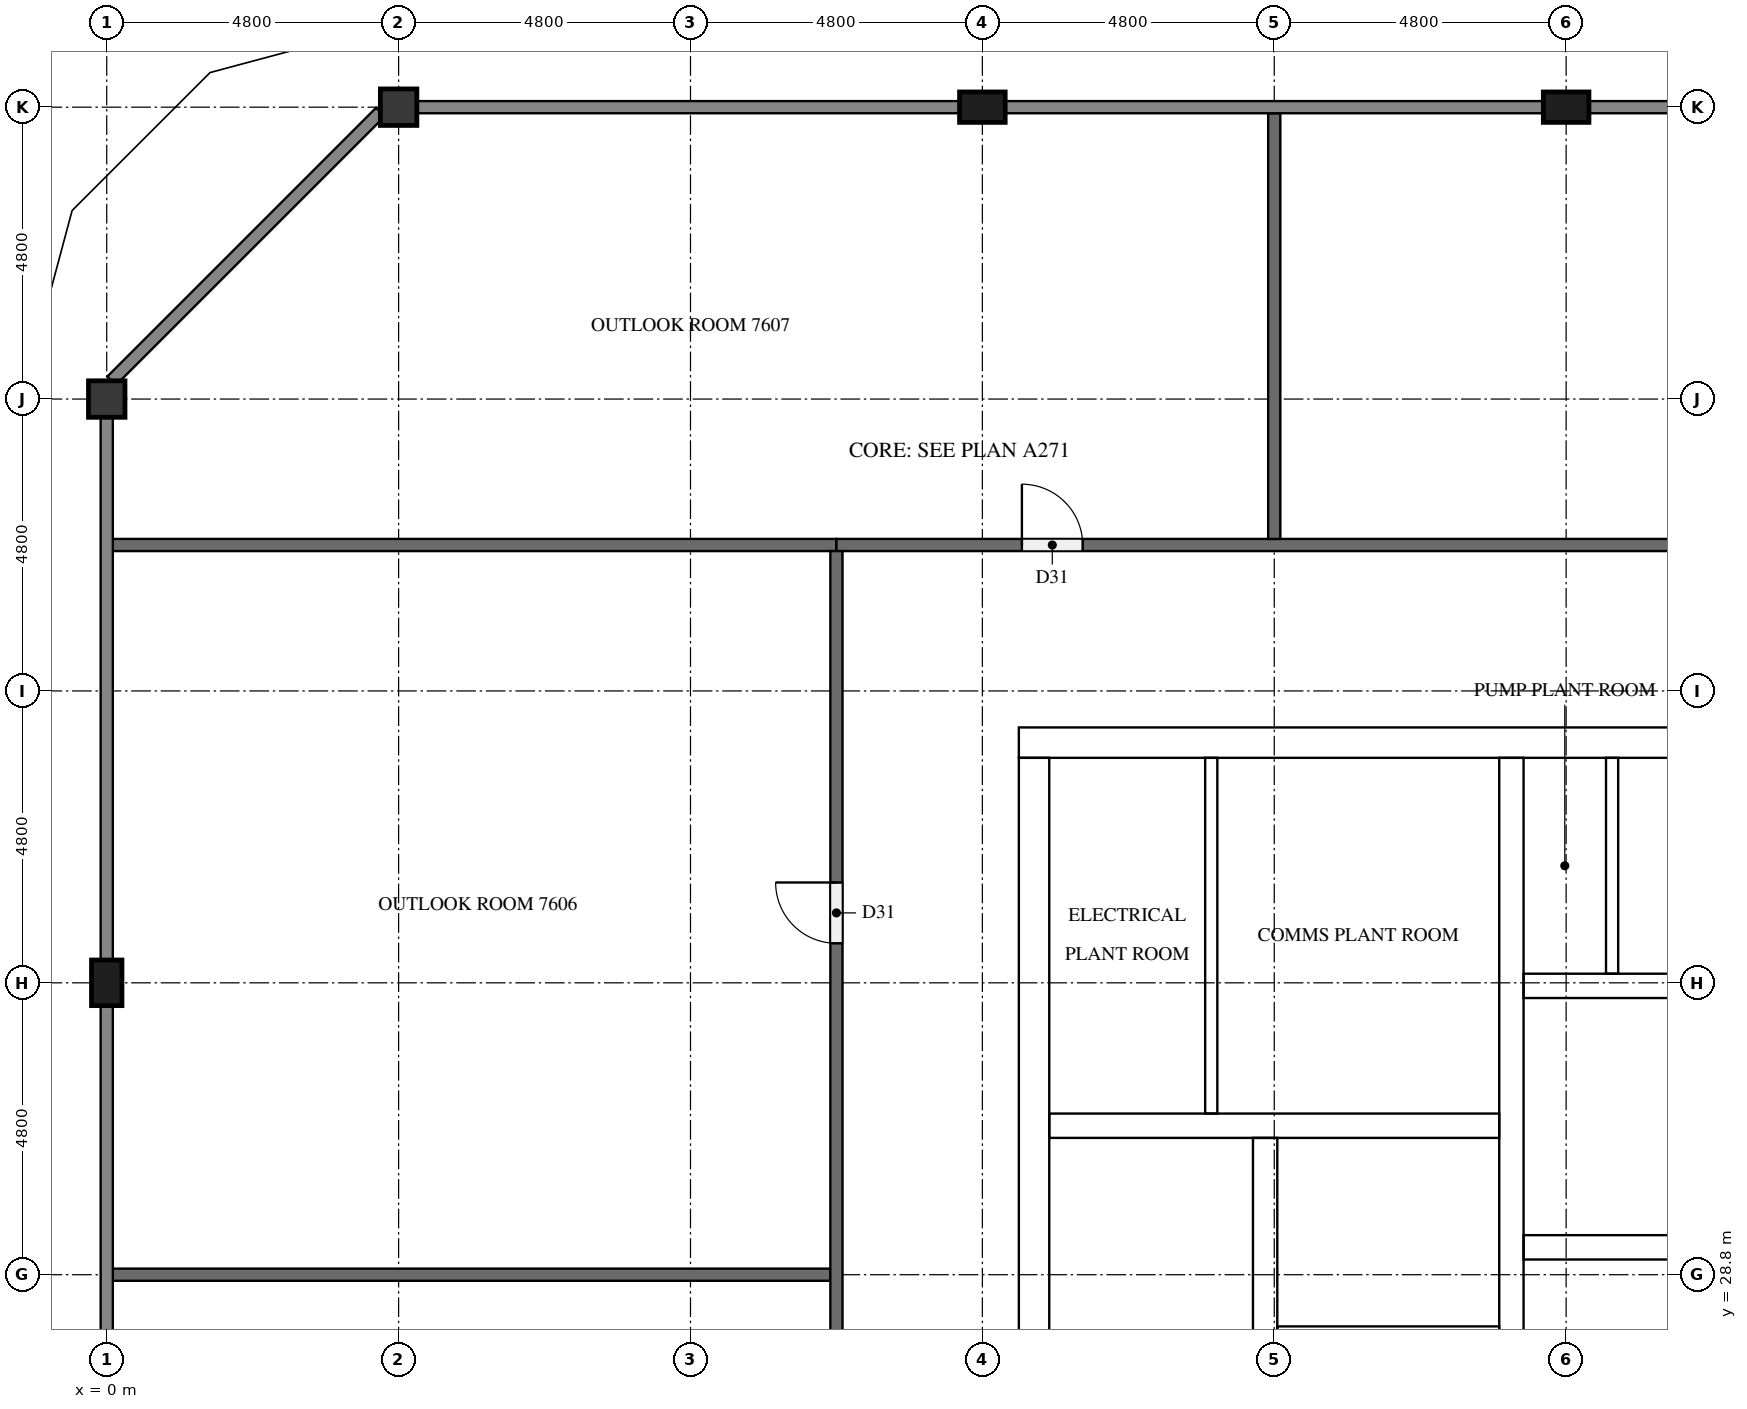
"""IFC4 building model, lengths in metres.
Left out: names, types, materials, properties, quantities, classifications, styles, units other than length and angle.
Written with IfcOpenShell. Run it as: python <this file> out.ifc"""

import sys

from ifc_helpers import new_model, si_unit, direction, frame, frame_2d, origin, origin_2d, place, context, subcontext, project, spatial, rectangle, extrude, element, fill, save


model = new_model("IFC4")
c1 = context("Model", 3, precision=1e-05, world=origin(), true_north=direction((0.0, 1.0)))
c2 = subcontext(c1, "Body", "Model", "MODEL_VIEW")
j1 = project(units=[si_unit("LENGTHUNIT", "METRE"), si_unit("PLANEANGLEUNIT", "RADIAN")], contexts=[c1])
p1 = place(None, origin())
s1 = spatial("IfcSite", under=j1, at=p1, CompositionType="ELEMENT")
p2 = place(p1, origin())
s2 = spatial("IfcBuilding", under=s1, at=p2, CompositionType="ELEMENT")
p3 = place(p2, frame((0.0, 0.0, 291.5)))
s3 = spatial("IfcBuildingStorey", under=s2, at=p3, CompositionType="ELEMENT", Elevation=291.5)
p4 = place(p3, frame((15.0, 37.55, 0.0), z_axis=(0.0, 0.0, 1.0), x_axis=(1.0, 0.0, 0.0)))
e1 = element("IfcWall", 1, at=p4, inside=s3, PredefinedType="SHEAR", context=c2, shape_type="SweptSolid", body=[
    extrude(rectangle(XDim=32.4, YDim=0.5, at=frame_2d((16.2, 0.0))), origin(), (0.0, 0.0, 1.0), 4.4),
])
p5 = place(p4, frame((15.3, 0.0, 0.0)))
e2 = element("IfcOpeningElement", 2, at=p5, cuts=e1, PredefinedType="OPENING", context=c2, shape_type="SweptSolid", body=[
    extrude(rectangle(XDim=1.8, YDim=2.1, at=frame_2d((0.9, 1.05))), frame((0.0, 0.26, 0.0), z_axis=(0.0, -1.0, 0.0), x_axis=(1.0, 0.0, 0.0)), (0.0, 0.0, 1.0), 0.52),
])
p6 = place(p4, frame((1.282, 0.0, 0.0)))
e3 = element("IfcOpeningElement", 3, at=p6, cuts=e1, PredefinedType="OPENING", context=c2, shape_type="SweptSolid", body=[
    extrude(rectangle(XDim=1.0, YDim=2.1, at=frame_2d((0.5, 1.05))), frame((0.0, 0.26, 0.0), z_axis=(0.0, -1.0, 0.0), x_axis=(1.0, 0.0, 0.0)), (0.0, 0.0, 1.0), 0.52),
])
p7 = place(p4, frame((5.082, 0.0, 0.0)))
e4 = element("IfcOpeningElement", 4, at=p7, cuts=e1, PredefinedType="OPENING", context=c2, shape_type="SweptSolid", body=[
    extrude(rectangle(XDim=1.0, YDim=2.1, at=frame_2d((0.5, 1.05))), frame((0.0, 0.26, 0.0), z_axis=(0.0, -1.0, 0.0), x_axis=(1.0, 0.0, 0.0)), (0.0, 0.0, 1.0), 0.52),
])
p8 = place(p3, frame((15.25, 15.5, 0.0), z_axis=(0.0, 0.0, 1.0), x_axis=(0.0, 1.0, 0.0)))
e5 = element("IfcWall", 5, at=p8, inside=s3, PredefinedType="SHEAR", context=c2, shape_type="SweptSolid", body=[
    extrude(rectangle(XDim=21.8, YDim=0.5, at=frame_2d((10.9, 0.0))), origin(), (0.0, 0.0, 1.0), 4.4),
])
p9 = place(p8, frame((5.26, 0.0, 0.0)))
e6 = element("IfcOpeningElement", 6, at=p9, cuts=e5, PredefinedType="OPENING", context=c2, shape_type="SweptSolid", body=[
    extrude(rectangle(XDim=1.2, YDim=2.1, at=frame_2d((0.6, 1.05))), frame((0.0, 0.26, 0.0), z_axis=(0.0, -1.0, 0.0), x_axis=(1.0, 0.0, 0.0)), (0.0, 0.0, 1.0), 0.52),
])
p10 = place(p3, frame((19.05, 15.5, 0.0), z_axis=(0.0, 0.0, 1.0), x_axis=(0.0, 1.0, 0.0)))
e7 = element("IfcWall", 7, at=p10, inside=s3, PredefinedType="SHEAR", context=c2, shape_type="SweptSolid", body=[
    extrude(rectangle(XDim=15.55, YDim=0.4, at=frame_2d((7.775, 0.0))), origin(), (0.0, 0.0, 1.0), 4.4),
])
p11 = place(p10, frame((9.95, 0.0, 0.0)))
e8 = element("IfcOpeningElement", 8, at=p11, cuts=e7, PredefinedType="OPENING", context=c2, shape_type="SweptSolid", body=[
    extrude(rectangle(XDim=1.1, YDim=2.1, at=frame_2d((0.55, 1.05))), frame((0.0, 0.21, 0.0), z_axis=(0.0, -1.0, 0.0), x_axis=(1.0, 0.0, 0.0)), (0.0, 0.0, 1.0), 0.42),
])
p12 = place(p10, frame((13.45, 0.0, 0.0)))
e9 = element("IfcOpeningElement", 9, at=p12, cuts=e7, PredefinedType="OPENING", context=c2, shape_type="SweptSolid", body=[
    extrude(rectangle(XDim=1.1, YDim=2.1, at=frame_2d((0.55, 1.05))), frame((0.0, 0.21, 0.0), z_axis=(0.0, -1.0, 0.0), x_axis=(1.0, 0.0, 0.0)), (0.0, 0.0, 1.0), 0.42),
])
p13 = place(p10, frame((0.7, 0.0, 0.0)))
e10 = element("IfcOpeningElement", 10, at=p13, cuts=e7, PredefinedType="OPENING", context=c2, shape_type="SweptSolid", body=[
    extrude(rectangle(XDim=1.2, YDim=2.1, at=frame_2d((0.6, 1.05))), frame((0.0, 0.21, 0.0), z_axis=(0.0, -1.0, 0.0), x_axis=(1.0, 0.0, 0.0)), (0.0, 0.0, 1.0), 0.42),
])
p14 = place(p3, frame((23.1, 15.5, 0.0), z_axis=(0.0, 0.0, 1.0), x_axis=(0.0, 1.0, 0.0)))
e11 = element("IfcWall", 11, at=p14, inside=s3, PredefinedType="SHEAR", context=c2, shape_type="SweptSolid", body=[
    extrude(rectangle(XDim=21.8, YDim=0.4, at=frame_2d((10.9, 0.0))), origin(), (0.0, 0.0, 1.0), 4.4),
])
p15 = place(p3, frame((19.25, 27.75, 0.0), z_axis=(0.0, 0.0, 1.0), x_axis=(1.0, 0.0, 0.0)))
e12 = element("IfcWall", 12, at=p15, inside=s3, PredefinedType="SHEAR", context=c2, shape_type="SweptSolid", body=[
    extrude(rectangle(XDim=3.65, YDim=0.4, at=frame_2d((1.825, 0.0))), origin(), (0.0, 0.0, 1.0), 4.4),
])
p16 = place(p3, frame((15.5, 31.25, 0.0), z_axis=(0.0, 0.0, 1.0), x_axis=(1.0, 0.0, 0.0)))
e13 = element("IfcWall", 13, at=p16, inside=s3, PredefinedType="SHEAR", context=c2, shape_type="SweptSolid", body=[
    extrude(rectangle(XDim=7.4, YDim=0.4, at=frame_2d((3.7, 0.0))), origin(), (0.0, 0.0, 1.0), 4.4),
])
p17 = place(p3, frame((23.3, 29.25, 0.0), z_axis=(0.0, 0.0, 1.0), x_axis=(1.0, 0.0, 0.0)))
e14 = element("IfcWall", 14, at=p17, inside=s3, PredefinedType="SHEAR", context=c2, shape_type="SweptSolid", body=[
    extrude(rectangle(XDim=15.8, YDim=0.4, at=frame_2d((7.9, 0.0))), origin(), (0.0, 0.0, 1.0), 4.4),
])
p18 = place(p17, frame((0.683, 0.0, 0.0)))
e15 = element("IfcOpeningElement", 15, at=p18, cuts=e14, PredefinedType="OPENING", context=c2, shape_type="SweptSolid", body=[
    extrude(rectangle(XDim=1.1, YDim=2.1, at=frame_2d((0.55, 1.05))), frame((0.0, 0.21, 0.0), z_axis=(0.0, -1.0, 0.0), x_axis=(1.0, 0.0, 0.0)), (0.0, 0.0, 1.0), 0.42),
])
p19 = place(p17, frame((3.35, 0.0, 0.0)))
e16 = element("IfcOpeningElement", 16, at=p19, cuts=e14, PredefinedType="OPENING", context=c2, shape_type="SweptSolid", body=[
    extrude(rectangle(XDim=1.1, YDim=2.1, at=frame_2d((0.55, 1.05))), frame((0.0, 0.21, 0.0), z_axis=(0.0, -1.0, 0.0), x_axis=(1.0, 0.0, 0.0)), (0.0, 0.0, 1.0), 0.42),
])
p20 = place(p17, frame((6.017, 0.0, 0.0)))
e17 = element("IfcOpeningElement", 17, at=p20, cuts=e14, PredefinedType="OPENING", context=c2, shape_type="SweptSolid", body=[
    extrude(rectangle(XDim=1.1, YDim=2.1, at=frame_2d((0.55, 1.05))), frame((0.0, 0.21, 0.0), z_axis=(0.0, -1.0, 0.0), x_axis=(1.0, 0.0, 0.0)), (0.0, 0.0, 1.0), 0.42),
])
p21 = place(p17, frame((8.683, 0.0, 0.0)))
e18 = element("IfcOpeningElement", 18, at=p21, cuts=e14, PredefinedType="OPENING", context=c2, shape_type="SweptSolid", body=[
    extrude(rectangle(XDim=1.1, YDim=2.1, at=frame_2d((0.55, 1.05))), frame((0.0, 0.21, 0.0), z_axis=(0.0, -1.0, 0.0), x_axis=(1.0, 0.0, 0.0)), (0.0, 0.0, 1.0), 0.42),
])
p22 = place(p17, frame((11.35, 0.0, 0.0)))
e19 = element("IfcOpeningElement", 19, at=p22, cuts=e14, PredefinedType="OPENING", context=c2, shape_type="SweptSolid", body=[
    extrude(rectangle(XDim=1.1, YDim=2.1, at=frame_2d((0.55, 1.05))), frame((0.0, 0.21, 0.0), z_axis=(0.0, -1.0, 0.0), x_axis=(1.0, 0.0, 0.0)), (0.0, 0.0, 1.0), 0.42),
])
p23 = place(p17, frame((14.017, 0.0, 0.0)))
e20 = element("IfcOpeningElement", 20, at=p23, cuts=e14, PredefinedType="OPENING", context=c2, shape_type="SweptSolid", body=[
    extrude(rectangle(XDim=1.1, YDim=2.1, at=frame_2d((0.55, 1.05))), frame((0.0, 0.21, 0.0), z_axis=(0.0, -1.0, 0.0), x_axis=(1.0, 0.0, 0.0)), (0.0, 0.0, 1.0), 0.42),
])
p24 = place(p3, frame((23.3, 33.55, 0.0), z_axis=(0.0, 0.0, 1.0), x_axis=(1.0, 0.0, 0.0)))
e21 = element("IfcWall", 21, at=p24, inside=s3, PredefinedType="SHEAR", context=c2, shape_type="SweptSolid", body=[
    extrude(rectangle(XDim=5.6, YDim=0.4, at=frame_2d((2.8, 0.0))), origin(), (0.0, 0.0, 1.0), 4.4),
])
p25 = place(p24, frame((0.178, 0.0, 0.0)))
e22 = element("IfcOpeningElement", 22, at=p25, cuts=e21, PredefinedType="OPENING", context=c2, shape_type="SweptSolid", body=[
    extrude(rectangle(XDim=1.0, YDim=2.1, at=frame_2d((0.5, 1.05))), frame((0.0, 0.21, 0.0), z_axis=(0.0, -1.0, 0.0), x_axis=(1.0, 0.0, 0.0)), (0.0, 0.0, 1.0), 0.42),
])
p26 = place(p24, frame((2.878, 0.0, 0.0)))
e23 = element("IfcOpeningElement", 23, at=p26, cuts=e21, PredefinedType="OPENING", context=c2, shape_type="SweptSolid", body=[
    extrude(rectangle(XDim=1.0, YDim=2.1, at=frame_2d((0.5, 1.05))), frame((0.0, 0.21, 0.0), z_axis=(0.0, -1.0, 0.0), x_axis=(1.0, 0.0, 0.0)), (0.0, 0.0, 1.0), 0.42),
])
for number, where, z_axis, x_axis in (
    (24, (24.0, 48.0, 0.0), (0.0, 0.0, 1.0), (1.0, 0.0, 0.0)),
    (25, (14.4, 48.0, 0.0), (0.0, 0.0, 1.0), (1.0, 0.0, 0.0)),
):
    element("IfcColumn", number, at=place(p3, frame(where, z_axis=z_axis, x_axis=x_axis)), inside=s3, PredefinedType="COLUMN", context=c2, shape_type="SweptSolid", body=[
        extrude(rectangle(XDim=0.75, YDim=0.5, at=origin_2d()), origin(), (0.0, 0.0, 1.0), 4.4),
    ])
for number, where, z_axis, x_axis in (
    (26, (4.8, 48.0, 0.0), (0.0, 0.0, 1.0), (1.0, 0.0, 0.0)),
    (27, (0.0, 43.2, 0.0), (0.0, 0.0, 1.0), (1.0, 0.0, 0.0)),
):
    element("IfcColumn", number, at=place(p3, frame(where, z_axis=z_axis, x_axis=x_axis)), inside=s3, PredefinedType="COLUMN", context=c2, shape_type="SweptSolid", body=[
        extrude(rectangle(XDim=0.6, YDim=0.6, at=origin_2d()), origin(), (0.0, 0.0, 1.0), 4.4),
    ])
p27 = place(p3, frame((0.0, 33.6, 0.0), z_axis=(0.0, 0.0, 1.0), x_axis=(0.0, 1.0, 0.0)))
e28 = element("IfcColumn", 28, at=p27, inside=s3, PredefinedType="COLUMN", context=c2, shape_type="SweptSolid", body=[
    extrude(rectangle(XDim=0.75, YDim=0.5, at=origin_2d()), origin(), (0.0, 0.0, 1.0), 4.4),
])
p28 = place(p3, frame((18.164, 31.45, 0.0), z_axis=(0.0, 0.0, 1.0), x_axis=(0.0, 1.0, 0.0)))
e29 = element("IfcWall", 29, at=p28, inside=s3, PredefinedType="PARTITIONING", context=c2, shape_type="SweptSolid", body=[
    extrude(rectangle(XDim=5.85, YDim=0.2, at=frame_2d((2.925, 0.0))), origin(), (0.0, 0.0, 1.0), 4.4),
])
p29 = place(p3, frame((24.756, 33.75, 0.0), z_axis=(0.0, 0.0, 1.0), x_axis=(0.0, 1.0, 0.0)))
e30 = element("IfcWall", 30, at=p29, inside=s3, PredefinedType="PARTITIONING", context=c2, shape_type="SweptSolid", body=[
    extrude(rectangle(XDim=3.55, YDim=0.2, at=frame_2d((1.775, 0.0))), origin(), (0.0, 0.0, 1.0), 4.4),
])
p30 = place(p3, frame((0.1, 28.8, 0.0), z_axis=(0.0, 0.0, 1.0), x_axis=(1.0, 0.0, 0.0)))
e31 = element("IfcWall", 31, at=p30, inside=s3, PredefinedType="PARTITIONING", context=c2, shape_type="SweptSolid", body=[
    extrude(rectangle(XDim=11.8, YDim=0.2, at=frame_2d((5.9, 0.0))), origin(), (0.0, 0.0, 1.0), 4.4),
])
p31 = place(p3, frame((0.1, 40.8, 0.0), z_axis=(0.0, 0.0, 1.0), x_axis=(1.0, 0.0, 0.0)))
e32 = element("IfcWall", 32, at=p31, inside=s3, PredefinedType="PARTITIONING", context=c2, shape_type="SweptSolid", body=[
    extrude(rectangle(XDim=11.9, YDim=0.2, at=frame_2d((5.95, 0.0))), origin(), (0.0, 0.0, 1.0), 4.4),
])
p32 = place(p3, frame((12.0, 40.8, 0.0), z_axis=(0.0, 0.0, 1.0), x_axis=(1.0, 0.0, 0.0)))
e33 = element("IfcWall", 33, at=p32, inside=s3, PredefinedType="PARTITIONING", context=c2, shape_type="SweptSolid", body=[
    extrude(rectangle(XDim=29.4, YDim=0.2, at=frame_2d((14.7, 0.0))), origin(), (0.0, 0.0, 1.0), 4.4),
])
p33 = place(p32, frame((3.05, 0.0, 0.0)))
e34 = element("IfcOpeningElement", 34, at=p33, cuts=e33, PredefinedType="OPENING", context=c2, shape_type="SweptSolid", body=[
    extrude(rectangle(XDim=1.0, YDim=2.1, at=frame_2d((0.5, 1.05))), frame((0.0, 0.11, 0.0), z_axis=(0.0, -1.0, 0.0), x_axis=(1.0, 0.0, 0.0)), (0.0, 0.0, 1.0), 0.22),
])
p34 = place(p32, frame((16.25, 0.0, 0.0)))
e35 = element("IfcOpeningElement", 35, at=p34, cuts=e33, PredefinedType="OPENING", context=c2, shape_type="SweptSolid", body=[
    extrude(rectangle(XDim=1.0, YDim=2.1, at=frame_2d((0.5, 1.05))), frame((0.0, 0.11, 0.0), z_axis=(0.0, -1.0, 0.0), x_axis=(1.0, 0.0, 0.0)), (0.0, 0.0, 1.0), 0.22),
])
p35 = place(p3, frame((12.0, 12.1, 0.0), z_axis=(0.0, 0.0, 1.0), x_axis=(0.0, 1.0, 0.0)))
e36 = element("IfcWall", 36, at=p35, inside=s3, PredefinedType="PARTITIONING", context=c2, shape_type="SweptSolid", body=[
    extrude(rectangle(XDim=28.6, YDim=0.2, at=frame_2d((14.3, 0.0))), origin(), (0.0, 0.0, 1.0), 4.4),
])
p36 = place(p35, frame((7.85, 0.0, 0.0)))
e37 = element("IfcOpeningElement", 37, at=p36, cuts=e36, PredefinedType="OPENING", context=c2, shape_type="SweptSolid", body=[
    extrude(rectangle(XDim=1.0, YDim=2.1, at=frame_2d((0.5, 1.05))), frame((0.0, 0.11, 0.0), z_axis=(0.0, -1.0, 0.0), x_axis=(1.0, 0.0, 0.0)), (0.0, 0.0, 1.0), 0.22),
])
p37 = place(p35, frame((22.15, 0.0, 0.0)))
e38 = element("IfcOpeningElement", 38, at=p37, cuts=e36, PredefinedType="OPENING", context=c2, shape_type="SweptSolid", body=[
    extrude(rectangle(XDim=1.0, YDim=2.1, at=frame_2d((0.5, 1.05))), frame((0.0, 0.11, 0.0), z_axis=(0.0, -1.0, 0.0), x_axis=(1.0, 0.0, 0.0)), (0.0, 0.0, 1.0), 0.22),
])
p38 = place(p3, frame((19.2, 40.9, 0.0), z_axis=(0.0, 0.0, 1.0), x_axis=(0.0, 1.0, 0.0)))
e39 = element("IfcWall", 39, at=p38, inside=s3, PredefinedType="PARTITIONING", context=c2, shape_type="SweptSolid", body=[
    extrude(rectangle(XDim=7.0, YDim=0.2, at=frame_2d((3.5, 0.0))), origin(), (0.0, 0.0, 1.0), 4.4),
])
p39 = place(p18, origin())
e40 = element("IfcDoor", 40, at=p39, inside=s3, OperationType="DOUBLE_DOOR_SLIDING", PredefinedType="DOOR", context=c2, shape_type="SweptSolid", body=[
    extrude(rectangle(XDim=1.1, YDim=2.1, at=frame_2d((0.55, 1.05))), frame((0.0, 0.025, 0.0), z_axis=(0.0, -1.0, 0.0), x_axis=(1.0, 0.0, 0.0)), (0.0, 0.0, 1.0), 0.05),
])
fill(e15, e40)
p40 = place(p12, origin())
e41 = element("IfcDoor", 41, at=p40, inside=s3, OperationType="DOUBLE_DOOR_SLIDING", PredefinedType="DOOR", context=c2, shape_type="SweptSolid", body=[
    extrude(rectangle(XDim=1.1, YDim=2.1, at=frame_2d((0.55, 1.05))), frame((0.0, 0.025, 0.0), z_axis=(0.0, -1.0, 0.0), x_axis=(1.0, 0.0, 0.0)), (0.0, 0.0, 1.0), 0.05),
])
fill(e9, e41)
p41 = place(p6, origin())
e42 = element("IfcDoor", 42, at=p41, inside=s3, OperationType="SINGLE_SWING_LEFT", PredefinedType="DOOR", context=c2, shape_type="SweptSolid", body=[
    extrude(rectangle(XDim=1.0, YDim=2.1, at=frame_2d((0.5, 1.05))), frame((0.0, 0.025, 0.0), z_axis=(0.0, -1.0, 0.0), x_axis=(1.0, 0.0, 0.0)), (0.0, 0.0, 1.0), 0.05),
])
fill(e3, e42)
p42 = place(p7, origin())
e43 = element("IfcDoor", 43, at=p42, inside=s3, OperationType="SINGLE_SWING_RIGHT", PredefinedType="DOOR", context=c2, shape_type="SweptSolid", body=[
    extrude(rectangle(XDim=1.0, YDim=2.1, at=frame_2d((0.5, 1.05))), frame((0.0, 0.025, 0.0), z_axis=(0.0, -1.0, 0.0), x_axis=(1.0, 0.0, 0.0)), (0.0, 0.0, 1.0), 0.05),
])
fill(e4, e43)
p43 = place(p25, frame((1.0, 0.0, 0.0), z_axis=(0.0, 0.0, 1.0), x_axis=(-1.0, 0.0, 0.0)))
e44 = element("IfcDoor", 44, at=p43, inside=s3, OperationType="SINGLE_SWING_LEFT", PredefinedType="DOOR", context=c2, shape_type="SweptSolid", body=[
    extrude(rectangle(XDim=1.0, YDim=2.1, at=frame_2d((0.5, 1.05))), frame((0.0, 0.025, 0.0), z_axis=(0.0, -1.0, 0.0), x_axis=(1.0, 0.0, 0.0)), (0.0, 0.0, 1.0), 0.05),
])
fill(e22, e44)
p44 = place(p37, origin())
e45 = element("IfcDoor", 45, at=p44, inside=s3, OperationType="SINGLE_SWING_RIGHT", PredefinedType="DOOR", context=c2, shape_type="SweptSolid", body=[
    extrude(rectangle(XDim=1.0, YDim=2.1, at=frame_2d((0.5, 1.05))), frame((0.0, 0.025, 0.0), z_axis=(0.0, -1.0, 0.0), x_axis=(1.0, 0.0, 0.0)), (0.0, 0.0, 1.0), 0.05),
])
fill(e38, e45)
p45 = place(p33, origin())
e46 = element("IfcDoor", 46, at=p45, inside=s3, OperationType="SINGLE_SWING_LEFT", PredefinedType="DOOR", context=c2, shape_type="SweptSolid", body=[
    extrude(rectangle(XDim=1.0, YDim=2.1, at=frame_2d((0.5, 1.05))), frame((0.0, 0.025, 0.0), z_axis=(0.0, -1.0, 0.0), x_axis=(1.0, 0.0, 0.0)), (0.0, 0.0, 1.0), 0.05),
])
fill(e34, e46)
save(model, sys.argv[1])
